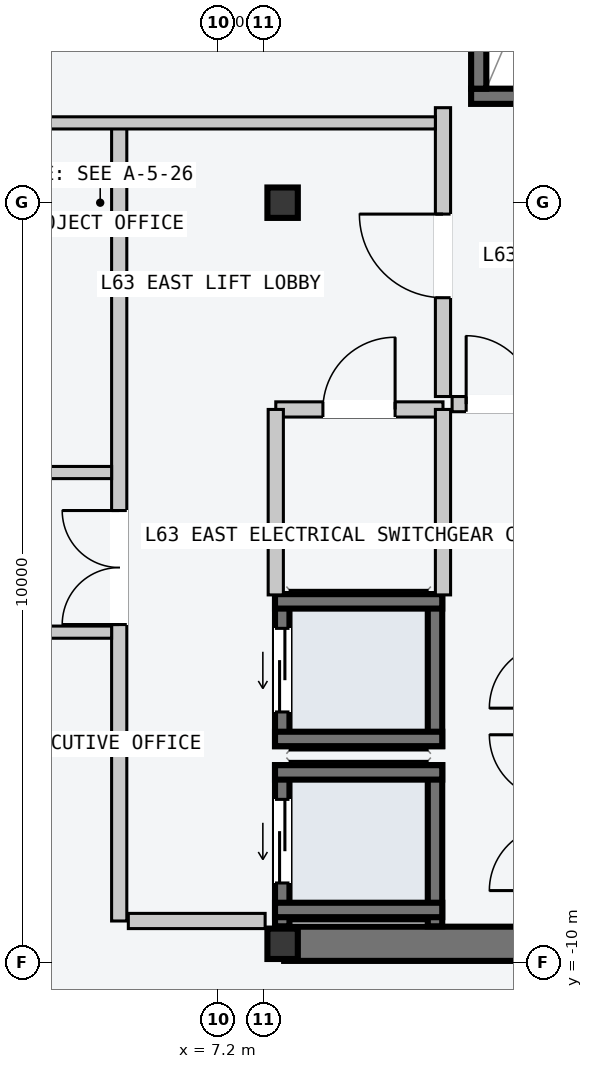
"""IFC4 building model, lengths in metres.
Left out: names, types, materials, properties, quantities, classifications, styles, units other than length and angle.
Written with IfcOpenShell. Run it as: python <this file> out.ifc"""

import sys

from ifc_helpers import new_model, si_unit, direction, frame, frame_2d, origin, origin_2d, place, context, subcontext, project, spatial, rectangle, i_section, extrude, element, fill, save


model = new_model("IFC4")
c1 = context("Model", 3, precision=1e-05, world=origin(), true_north=direction((0.0, 1.0)))
c2 = subcontext(c1, "Body", "Model", "MODEL_VIEW")
j1 = project(units=[si_unit("LENGTHUNIT", "METRE"), si_unit("PLANEANGLEUNIT", "RADIAN")], contexts=[c1])
p1 = place(None, origin())
s1 = spatial("IfcSite", under=j1, at=p1, CompositionType="ELEMENT")
p2 = place(p1, origin())
s2 = spatial("IfcBuilding", under=s1, at=p2, CompositionType="ELEMENT")
p3 = place(p2, frame((0.0, 0.0, 240.0)))
s3 = spatial("IfcBuildingStorey", under=s2, at=p3, CompositionType="ELEMENT", Elevation=240.0)
p4 = place(p3, frame((8.07, -9.75, -0.2), z_axis=(0.0, 0.0, 1.0), x_axis=(1.0, 0.0, 0.0)))
e1 = element("IfcWall", 1, at=p4, inside=s3, PredefinedType="SHEAR", context=c2, shape_type="SweptSolid", body=[
    extrude(rectangle(XDim=6.46, YDim=0.45, at=frame_2d((3.23, 0.0))), origin(), (0.0, 0.0, 1.0), 3.6),
])
p5 = place(p3, frame((10.53, 1.4, -0.2), z_axis=(0.0, 0.0, 1.0), x_axis=(1.0, 0.0, 0.0)))
e2 = element("IfcWall", 2, at=p5, inside=s3, PredefinedType="SOLIDWALL", context=c2, shape_type="SweptSolid", body=[
    extrude(rectangle(XDim=3.72, YDim=0.2, at=frame_2d((1.86, 0.0))), origin(), (0.0, 0.0, 1.0), 3.6),
])
p6 = place(p5, frame((1.5, 0.0, 0.2)))
e3 = element("IfcOpeningElement", 3, at=p6, cuts=e2, PredefinedType="OPENING", context=c2, shape_type="SweptSolid", body=[
    extrude(rectangle(XDim=1.12, YDim=2.18, at=frame_2d((0.56, 1.09))), frame((0.0, 0.11, 0.0), z_axis=(0.0, -1.0, 0.0), x_axis=(1.0, 0.0, 0.0)), (0.0, 0.0, 1.0), 0.22),
])
p7 = place(p3, frame((10.63, 1.5, -0.2), z_axis=(0.0, 0.0, 1.0), x_axis=(0.0, 1.0, 0.0)))
e4 = element("IfcWall", 4, at=p7, inside=s3, PredefinedType="SOLIDWALL", context=c2, shape_type="SweptSolid", body=[
    extrude(rectangle(XDim=7.8, YDim=0.2, at=frame_2d((3.9, 0.0))), origin(), (0.0, 0.0, 1.0), 3.6),
])
for number, where, z_axis, x_axis in (
    (5, (8.05, -9.75, 0.0), (0.0, 0.0, 1.0), (1.0, 0.0, 0.0)),
    (6, (8.05, 0.0, 0.0), (0.0, 0.0, 1.0), (1.0, 0.0, 0.0)),
):
    element("IfcColumn", number, at=place(p3, frame(where, z_axis=z_axis, x_axis=x_axis)), inside=s3, PredefinedType="COLUMN", context=c2, shape_type="SweptSolid", body=[
        extrude(i_section(OverallWidth=0.4, OverallDepth=0.4, WebThickness=0.013, FlangeThickness=0.021, at=origin_2d()), origin(), (0.0, 0.0, 1.0), 3.6),
    ])
p8 = place(p3, frame((8.045, -9.52, -0.2), z_axis=(0.0, 0.0, 1.0), x_axis=(0.0, 1.0, 0.0)))
e7 = element("IfcWall", 7, at=p8, inside=s3, PredefinedType="SOLIDWALL", context=c2, shape_type="SweptSolid", body=[
    extrude(rectangle(XDim=2.12, YDim=0.19, at=frame_2d((1.06, 0.0))), origin(), (0.0, 0.0, 1.0), 3.6),
])
p9 = place(p8, frame((0.57, 0.0, 0.2)))
e8 = element("IfcOpeningElement", 8, at=p9, cuts=e7, PredefinedType="OPENING", context=c2, shape_type="SweptSolid", body=[
    extrude(rectangle(XDim=1.1, YDim=2.2, at=frame_2d((0.55, 1.1))), frame((0.0, 0.105, 0.0), z_axis=(0.0, -1.0, 0.0), x_axis=(1.0, 0.0, 0.0)), (0.0, 0.0, 1.0), 0.21),
])
p10 = place(p3, frame((10.055, -9.52, -0.2), z_axis=(0.0, 0.0, 1.0), x_axis=(0.0, 1.0, 0.0)))
e9 = element("IfcWall", 9, at=p10, inside=s3, PredefinedType="SOLIDWALL", context=c2, shape_type="SweptSolid", body=[
    extrude(rectangle(XDim=2.12, YDim=0.19, at=frame_2d((1.06, 0.0))), origin(), (0.0, 0.0, 1.0), 3.6),
])
for number, where, z_axis, x_axis in (
    (10, (7.95, -7.495, -0.2), (0.0, 0.0, 1.0), (1.0, 0.0, 0.0)),
    (11, (7.95, -9.305, -0.2), (0.0, 0.0, 1.0), (1.0, 0.0, 0.0)),
):
    element("IfcWall", number, at=place(p3, frame(where, z_axis=z_axis, x_axis=x_axis)), inside=s3, PredefinedType="SOLIDWALL", context=c2, shape_type="SweptSolid", body=[
        extrude(rectangle(XDim=2.2, YDim=0.19, at=frame_2d((1.1, 0.0))), origin(), (0.0, 0.0, 1.0), 3.6),
    ])
p11 = place(p3, frame((8.045, -7.15, -0.2), z_axis=(0.0, 0.0, 1.0), x_axis=(0.0, 1.0, 0.0)))
e12 = element("IfcWall", 12, at=p11, inside=s3, PredefinedType="SOLIDWALL", context=c2, shape_type="SweptSolid", body=[
    extrude(rectangle(XDim=2.0, YDim=0.19, at=frame_2d((1.0, 0.0))), origin(), (0.0, 0.0, 1.0), 3.6),
])
p12 = place(p11, frame((0.45, 0.0, 0.2)))
e13 = element("IfcOpeningElement", 13, at=p12, cuts=e12, PredefinedType="OPENING", context=c2, shape_type="SweptSolid", body=[
    extrude(rectangle(XDim=1.1, YDim=2.2, at=frame_2d((0.55, 1.1))), frame((0.0, 0.105, 0.0), z_axis=(0.0, -1.0, 0.0), x_axis=(1.0, 0.0, 0.0)), (0.0, 0.0, 1.0), 0.21),
])
p13 = place(p3, frame((10.055, -7.15, -0.2), z_axis=(0.0, 0.0, 1.0), x_axis=(0.0, 1.0, 0.0)))
e14 = element("IfcWall", 14, at=p13, inside=s3, PredefinedType="SOLIDWALL", context=c2, shape_type="SweptSolid", body=[
    extrude(rectangle(XDim=2.0, YDim=0.19, at=frame_2d((1.0, 0.0))), origin(), (0.0, 0.0, 1.0), 3.6),
])
for number, where, z_axis, x_axis in (
    (15, (7.95, -5.245, -0.2), (0.0, 0.0, 1.0), (1.0, 0.0, 0.0)),
    (16, (7.95, -7.055, -0.2), (0.0, 0.0, 1.0), (1.0, 0.0, 0.0)),
):
    element("IfcWall", number, at=place(p3, frame(where, z_axis=z_axis, x_axis=x_axis)), inside=s3, PredefinedType="SOLIDWALL", context=c2, shape_type="SweptSolid", body=[
        extrude(rectangle(XDim=2.2, YDim=0.19, at=frame_2d((1.1, 0.0))), origin(), (0.0, 0.0, 1.0), 3.6),
    ])
p14 = place(p3, frame((5.9, -9.45, 0.0), z_axis=(0.0, 0.0, 1.0), x_axis=(0.0, 1.0, 0.0)))
e17 = element("IfcWall", 17, at=p14, inside=s3, PredefinedType="PARTITIONING", context=c2, shape_type="SweptSolid", body=[
    extrude(rectangle(XDim=10.5, YDim=0.2, at=frame_2d((5.25, 0.0))), origin(), (0.0, 0.0, 1.0), 3.4),
])
p15 = place(p14, frame((3.9, 0.0, 0.0)))
e18 = element("IfcOpeningElement", 18, at=p15, cuts=e17, PredefinedType="OPENING", context=c2, shape_type="SweptSolid", body=[
    extrude(rectangle(XDim=1.5, YDim=2.2, at=frame_2d((0.75, 1.1))), frame((0.0, 0.11, 0.0), z_axis=(0.0, -1.0, 0.0), x_axis=(1.0, 0.0, 0.0)), (0.0, 0.0, 1.0), 0.22),
])
p16 = place(p3, frame((6.02, -9.45, 0.0), z_axis=(0.0, 0.0, 1.0), x_axis=(1.0, 0.0, 0.0)))
e19 = element("IfcWall", 19, at=p16, inside=s3, PredefinedType="PARTITIONING", context=c2, shape_type="SweptSolid", body=[
    extrude(rectangle(XDim=1.8, YDim=0.2, at=frame_2d((0.9, 0.0))), origin(), (0.0, 0.0, 1.0), 3.4),
])
p17 = place(p3, frame((10.16, -2.55, 0.0), z_axis=(0.0, 0.0, 1.0), x_axis=(0.0, 1.0, 0.0)))
e20 = element("IfcWall", 20, at=p17, inside=s3, PredefinedType="PARTITIONING", context=c2, shape_type="SweptSolid", body=[
    extrude(rectangle(XDim=3.8, YDim=0.2, at=frame_2d((1.9, 0.0))), origin(), (0.0, 0.0, 1.0), 3.4),
])
p18 = place(p17, frame((1.3, 0.0, 0.0)))
e21 = element("IfcOpeningElement", 21, at=p18, cuts=e20, PredefinedType="OPENING", context=c2, shape_type="SweptSolid", body=[
    extrude(rectangle(XDim=1.1, YDim=2.15, at=frame_2d((0.55, 1.075))), frame((0.0, 0.11, 0.0), z_axis=(0.0, -1.0, 0.0), x_axis=(1.0, 0.0, 0.0)), (0.0, 0.0, 1.0), 0.22),
])
p19 = place(p3, frame((10.28, -2.65, 0.0), z_axis=(0.0, 0.0, 1.0), x_axis=(1.0, 0.0, 0.0)))
e22 = element("IfcWall", 22, at=p19, inside=s3, PredefinedType="PARTITIONING", context=c2, shape_type="SweptSolid", body=[
    extrude(rectangle(XDim=1.27, YDim=0.2, at=frame_2d((0.635, 0.0))), origin(), (0.0, 0.0, 1.0), 3.4),
])
p20 = place(p19, frame((0.185, 0.0, 0.0)))
e23 = element("IfcOpeningElement", 23, at=p20, cuts=e22, PredefinedType="OPENING", context=c2, shape_type="SweptSolid", body=[
    extrude(rectangle(XDim=0.9, YDim=2.15, at=frame_2d((0.45, 1.075))), frame((0.0, 0.11, 0.0), z_axis=(0.0, -1.0, 0.0), x_axis=(1.0, 0.0, 0.0)), (0.0, 0.0, 1.0), 0.22),
])
p21 = place(p3, frame((7.96, -2.72, 0.0), z_axis=(0.0, 0.0, 1.0), x_axis=(1.0, 0.0, 0.0)))
e24 = element("IfcWall", 24, at=p21, inside=s3, PredefinedType="PARTITIONING", context=c2, shape_type="SweptSolid", body=[
    extrude(rectangle(XDim=2.2, YDim=0.2, at=frame_2d((1.1, 0.0))), origin(), (0.0, 0.0, 1.0), 3.4),
])
p22 = place(p21, frame((0.62, 0.0, 0.0)))
e25 = element("IfcOpeningElement", 25, at=p22, cuts=e24, PredefinedType="OPENING", context=c2, shape_type="SweptSolid", body=[
    extrude(rectangle(XDim=0.95, YDim=2.1, at=frame_2d((0.475, 1.05))), frame((0.0, 0.11, 0.0), z_axis=(0.0, -1.0, 0.0), x_axis=(1.0, 0.0, 0.0)), (0.0, 0.0, 1.0), 0.22),
])
for number, where, z_axis, x_axis in (
    (26, (7.96, -5.16, 0.0), (0.0, 0.0, 1.0), (0.0, 1.0, 0.0)),
    (27, (10.16, -5.16, 0.0), (0.0, 0.0, 1.0), (0.0, 1.0, 0.0)),
):
    element("IfcWall", number, at=place(p3, frame(where, z_axis=z_axis, x_axis=x_axis)), inside=s3, PredefinedType="PARTITIONING", context=c2, shape_type="SweptSolid", body=[
        extrude(rectangle(XDim=2.44, YDim=0.2, at=frame_2d((1.22, 0.0))), origin(), (0.0, 0.0, 1.0), 3.4),
    ])
p23 = place(p3, frame((3.01, 1.05, 0.0), z_axis=(0.0, 0.0, 1.0), x_axis=(1.0, 0.0, 0.0)))
e28 = element("IfcWall", 28, at=p23, inside=s3, PredefinedType="PARTITIONING", context=c2, shape_type="SweptSolid", body=[
    extrude(rectangle(XDim=7.05, YDim=0.16, at=frame_2d((3.525, 0.0))), origin(), (0.0, 0.0, 1.0), 3.4),
])
for number, where, z_axis, x_axis in (
    (29, (3.01, -3.55, 0.0), (0.0, 0.0, 1.0), (1.0, 0.0, 0.0)),
    (30, (3.01, -5.65, 0.0), (0.0, 0.0, 1.0), (1.0, 0.0, 0.0)),
):
    element("IfcWall", number, at=place(p3, frame(where, z_axis=z_axis, x_axis=x_axis)), inside=s3, PredefinedType="PARTITIONING", context=c2, shape_type="SweptSolid", body=[
        extrude(rectangle(XDim=2.79, YDim=0.16, at=frame_2d((1.395, 0.0))), origin(), (0.0, 0.0, 1.0), 3.4),
    ])
p24 = place(p9, origin())
e31 = element("IfcDoor", 31, at=p24, inside=s3, OperationType="SLIDING_TO_LEFT", PredefinedType="DOOR", context=c2, shape_type="SweptSolid", body=[
    extrude(rectangle(XDim=1.1, YDim=2.2, at=frame_2d((0.55, 1.1))), frame((0.0, 0.025, 0.0), z_axis=(0.0, -1.0, 0.0), x_axis=(1.0, 0.0, 0.0)), (0.0, 0.0, 1.0), 0.05),
])
fill(e8, e31)
p25 = place(p12, origin())
e32 = element("IfcDoor", 32, at=p25, inside=s3, OperationType="SLIDING_TO_LEFT", PredefinedType="DOOR", context=c2, shape_type="SweptSolid", body=[
    extrude(rectangle(XDim=1.1, YDim=2.2, at=frame_2d((0.55, 1.1))), frame((0.0, 0.025, 0.0), z_axis=(0.0, -1.0, 0.0), x_axis=(1.0, 0.0, 0.0)), (0.0, 0.0, 1.0), 0.05),
])
fill(e13, e32)
p26 = place(p15, origin())
e33 = element("IfcDoor", 33, at=p26, inside=s3, OperationType="DOUBLE_DOOR_SINGLE_SWING", PredefinedType="DOOR", context=c2, shape_type="SweptSolid", body=[
    extrude(rectangle(XDim=1.5, YDim=2.2, at=frame_2d((0.75, 1.1))), frame((0.0, 0.025, 0.0), z_axis=(0.0, -1.0, 0.0), x_axis=(1.0, 0.0, 0.0)), (0.0, 0.0, 1.0), 0.05),
])
fill(e18, e33)
p27 = place(p18, origin())
e34 = element("IfcDoor", 34, at=p27, inside=s3, OperationType="SINGLE_SWING_RIGHT", PredefinedType="DOOR", context=c2, shape_type="SweptSolid", body=[
    extrude(rectangle(XDim=1.1, YDim=2.15, at=frame_2d((0.55, 1.075))), frame((0.0, 0.025, 0.0), z_axis=(0.0, -1.0, 0.0), x_axis=(1.0, 0.0, 0.0)), (0.0, 0.0, 1.0), 0.05),
])
fill(e21, e34)
p28 = place(p20, origin())
e35 = element("IfcDoor", 35, at=p28, inside=s3, OperationType="SINGLE_SWING_LEFT", PredefinedType="DOOR", context=c2, shape_type="SweptSolid", body=[
    extrude(rectangle(XDim=0.9, YDim=2.15, at=frame_2d((0.45, 1.075))), frame((0.0, 0.025, 0.0), z_axis=(0.0, -1.0, 0.0), x_axis=(1.0, 0.0, 0.0)), (0.0, 0.0, 1.0), 0.05),
])
fill(e23, e35)
p29 = place(p22, origin())
e36 = element("IfcDoor", 36, at=p29, inside=s3, OperationType="SINGLE_SWING_RIGHT", PredefinedType="DOOR", context=c2, shape_type="SweptSolid", body=[
    extrude(rectangle(XDim=0.95, YDim=2.1, at=frame_2d((0.475, 1.05))), frame((0.0, 0.025, 0.0), z_axis=(0.0, -1.0, 0.0), x_axis=(1.0, 0.0, 0.0)), (0.0, 0.0, 1.0), 0.05),
])
fill(e25, e36)
save(model, sys.argv[1])
